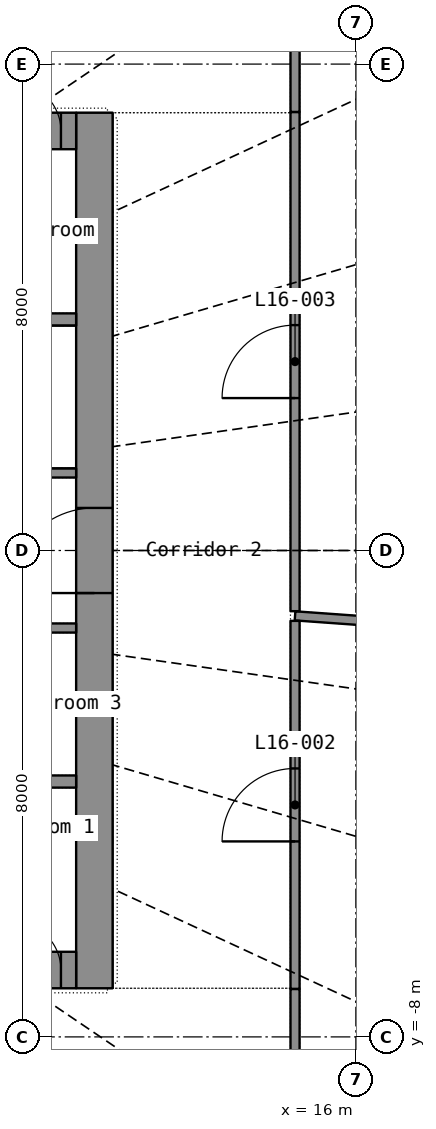
"""IFC4 building model, lengths in metres.
Left out: names, types, materials, properties, quantities, classifications, styles, units other than length and angle.
Written with IfcOpenShell. Run it as: python <this file> out.ifc"""

import sys

from ifc_helpers import new_model, si_unit, direction, frame, frame_2d, origin, place, context, subcontext, project, spatial, rectangle, extrude, element, fill, save


model = new_model("IFC4")
c1 = context("Model", 3, precision=1e-05, world=origin(), true_north=direction((0.0, 1.0)))
c2 = subcontext(c1, "Body", "Model", "MODEL_VIEW")
j1 = project(units=[si_unit("LENGTHUNIT", "METRE"), si_unit("PLANEANGLEUNIT", "RADIAN")], contexts=[c1])
p1 = place(None, origin())
s1 = spatial("IfcSite", under=j1, at=p1, CompositionType="ELEMENT")
p2 = place(p1, origin())
s2 = spatial("IfcBuilding", under=s1, at=p2, CompositionType="ELEMENT")
p3 = place(p2, frame((0.0, 0.0, 70.4)))
s3 = spatial("IfcBuildingStorey", under=s2, at=p3, CompositionType="ELEMENT", Elevation=70.4)
p4 = place(p3, frame((11.7, -7.2, 0.0), z_axis=(0.0, 0.0, 1.0), x_axis=(0.0, 1.0, 0.0)))
e1 = element("IfcWall", 1, at=p4, inside=s3, PredefinedType="SHEAR", context=c2, shape_type="SweptSolid", body=[
    extrude(rectangle(XDim=14.4, YDim=0.6, at=frame_2d((7.2, 0.0))), origin(), (0.0, 0.0, 1.0), 3.3),
])
p5 = place(p4, frame((6.5, 0.0, 0.0)))
e2 = element("IfcOpeningElement", 2, at=p5, cuts=e1, PredefinedType="OPENING", context=c2, shape_type="SweptSolid", body=[
    extrude(rectangle(XDim=1.4, YDim=2.2, at=frame_2d((0.7, 1.1))), frame((0.0, 0.31, 0.0), z_axis=(0.0, -1.0, 0.0), x_axis=(1.0, 0.0, 0.0)), (0.0, 0.0, 1.0), 0.62),
])
p6 = place(p3, frame((-11.4, -6.9, 0.0), z_axis=(0.0, 0.0, 1.0), x_axis=(1.0, 0.0, 0.0)))
e3 = element("IfcWall", 3, at=p6, inside=s3, PredefinedType="SHEAR", context=c2, shape_type="SweptSolid", body=[
    extrude(rectangle(XDim=22.8, YDim=0.6, at=frame_2d((11.4, 0.0))), origin(), (0.0, 0.0, 1.0), 3.3),
])
p7 = place(p6, frame((1.85, 0.0, 0.0)))
e4 = element("IfcOpeningElement", 4, at=p7, cuts=e3, PredefinedType="OPENING", context=c2, shape_type="SweptSolid", body=[
    extrude(rectangle(XDim=1.1, YDim=2.2, at=frame_2d((0.55, 1.1))), frame((0.0, 0.31, 0.0), z_axis=(0.0, -1.0, 0.0), x_axis=(1.0, 0.0, 0.0)), (0.0, 0.0, 1.0), 0.62),
])
p8 = place(p6, frame((3.85, 0.0, 0.0)))
e5 = element("IfcOpeningElement", 5, at=p8, cuts=e3, PredefinedType="OPENING", context=c2, shape_type="SweptSolid", body=[
    extrude(rectangle(XDim=1.1, YDim=2.2, at=frame_2d((0.55, 1.1))), frame((0.0, 0.31, 0.0), z_axis=(0.0, -1.0, 0.0), x_axis=(1.0, 0.0, 0.0)), (0.0, 0.0, 1.0), 0.62),
])
p9 = place(p6, frame((5.85, 0.0, 0.0)))
e6 = element("IfcOpeningElement", 6, at=p9, cuts=e3, PredefinedType="OPENING", context=c2, shape_type="SweptSolid", body=[
    extrude(rectangle(XDim=1.1, YDim=2.2, at=frame_2d((0.55, 1.1))), frame((0.0, 0.31, 0.0), z_axis=(0.0, -1.0, 0.0), x_axis=(1.0, 0.0, 0.0)), (0.0, 0.0, 1.0), 0.62),
])
p10 = place(p6, frame((7.85, 0.0, 0.0)))
e7 = element("IfcOpeningElement", 7, at=p10, cuts=e3, PredefinedType="OPENING", context=c2, shape_type="SweptSolid", body=[
    extrude(rectangle(XDim=1.1, YDim=2.2, at=frame_2d((0.55, 1.1))), frame((0.0, 0.31, 0.0), z_axis=(0.0, -1.0, 0.0), x_axis=(1.0, 0.0, 0.0)), (0.0, 0.0, 1.0), 0.62),
])
p11 = place(p6, frame((9.85, 0.0, 0.0)))
e8 = element("IfcOpeningElement", 8, at=p11, cuts=e3, PredefinedType="OPENING", context=c2, shape_type="SweptSolid", body=[
    extrude(rectangle(XDim=1.1, YDim=2.2, at=frame_2d((0.55, 1.1))), frame((0.0, 0.31, 0.0), z_axis=(0.0, -1.0, 0.0), x_axis=(1.0, 0.0, 0.0)), (0.0, 0.0, 1.0), 0.62),
])
p12 = place(p6, frame((11.85, 0.0, 0.0)))
e9 = element("IfcOpeningElement", 9, at=p12, cuts=e3, PredefinedType="OPENING", context=c2, shape_type="SweptSolid", body=[
    extrude(rectangle(XDim=1.1, YDim=2.2, at=frame_2d((0.55, 1.1))), frame((0.0, 0.31, 0.0), z_axis=(0.0, -1.0, 0.0), x_axis=(1.0, 0.0, 0.0)), (0.0, 0.0, 1.0), 0.62),
])
p13 = place(p6, frame((13.85, 0.0, 0.0)))
e10 = element("IfcOpeningElement", 10, at=p13, cuts=e3, PredefinedType="OPENING", context=c2, shape_type="SweptSolid", body=[
    extrude(rectangle(XDim=1.1, YDim=2.2, at=frame_2d((0.55, 1.1))), frame((0.0, 0.31, 0.0), z_axis=(0.0, -1.0, 0.0), x_axis=(1.0, 0.0, 0.0)), (0.0, 0.0, 1.0), 0.62),
])
p14 = place(p6, frame((15.85, 0.0, 0.0)))
e11 = element("IfcOpeningElement", 11, at=p14, cuts=e3, PredefinedType="OPENING", context=c2, shape_type="SweptSolid", body=[
    extrude(rectangle(XDim=1.1, YDim=2.2, at=frame_2d((0.55, 1.1))), frame((0.0, 0.31, 0.0), z_axis=(0.0, -1.0, 0.0), x_axis=(1.0, 0.0, 0.0)), (0.0, 0.0, 1.0), 0.62),
])
p15 = place(p6, frame((19.85, 0.0, 0.0)))
e12 = element("IfcOpeningElement", 12, at=p15, cuts=e3, PredefinedType="OPENING", context=c2, shape_type="SweptSolid", body=[
    extrude(rectangle(XDim=1.1, YDim=2.2, at=frame_2d((0.55, 1.1))), frame((0.0, 0.31, 0.0), z_axis=(0.0, -1.0, 0.0), x_axis=(1.0, 0.0, 0.0)), (0.0, 0.0, 1.0), 0.62),
])
p16 = place(p6, frame((0.25, 0.0, 0.0)))
e13 = element("IfcOpeningElement", 13, at=p16, cuts=e3, PredefinedType="OPENING", context=c2, shape_type="SweptSolid", body=[
    extrude(rectangle(XDim=0.8, YDim=2.05, at=frame_2d((0.4, 1.025))), frame((0.0, 0.31, 0.0), z_axis=(0.0, -1.0, 0.0), x_axis=(1.0, 0.0, 0.0)), (0.0, 0.0, 1.0), 0.62),
])
p17 = place(p6, frame((21.75, 0.0, 0.0)))
e14 = element("IfcOpeningElement", 14, at=p17, cuts=e3, PredefinedType="OPENING", context=c2, shape_type="SweptSolid", body=[
    extrude(rectangle(XDim=0.8, YDim=2.05, at=frame_2d((0.4, 1.025))), frame((0.0, 0.31, 0.0), z_axis=(0.0, -1.0, 0.0), x_axis=(1.0, 0.0, 0.0)), (0.0, 0.0, 1.0), 0.62),
])
p18 = place(p3, frame((-11.4, 6.9, 0.0), z_axis=(0.0, 0.0, 1.0), x_axis=(1.0, 0.0, 0.0)))
e15 = element("IfcWall", 15, at=p18, inside=s3, PredefinedType="SHEAR", context=c2, shape_type="SweptSolid", body=[
    extrude(rectangle(XDim=22.8, YDim=0.6, at=frame_2d((11.4, 0.0))), origin(), (0.0, 0.0, 1.0), 3.3),
])
p19 = place(p18, frame((1.85, 0.0, 0.0)))
e16 = element("IfcOpeningElement", 16, at=p19, cuts=e15, PredefinedType="OPENING", context=c2, shape_type="SweptSolid", body=[
    extrude(rectangle(XDim=1.1, YDim=2.2, at=frame_2d((0.55, 1.1))), frame((0.0, 0.31, 0.0), z_axis=(0.0, -1.0, 0.0), x_axis=(1.0, 0.0, 0.0)), (0.0, 0.0, 1.0), 0.62),
])
p20 = place(p18, frame((7.95, 0.0, 0.0)))
e17 = element("IfcOpeningElement", 17, at=p20, cuts=e15, PredefinedType="OPENING", context=c2, shape_type="SweptSolid", body=[
    extrude(rectangle(XDim=0.9, YDim=2.1, at=frame_2d((0.45, 1.05))), frame((0.0, 0.31, 0.0), z_axis=(0.0, -1.0, 0.0), x_axis=(1.0, 0.0, 0.0)), (0.0, 0.0, 1.0), 0.62),
])
p21 = place(p18, frame((13.95, 0.0, 0.0)))
e18 = element("IfcOpeningElement", 18, at=p21, cuts=e15, PredefinedType="OPENING", context=c2, shape_type="SweptSolid", body=[
    extrude(rectangle(XDim=0.9, YDim=2.1, at=frame_2d((0.45, 1.05))), frame((0.0, 0.31, 0.0), z_axis=(0.0, -1.0, 0.0), x_axis=(1.0, 0.0, 0.0)), (0.0, 0.0, 1.0), 0.62),
])
p22 = place(p18, frame((18.95, 0.0, 0.0)))
e19 = element("IfcOpeningElement", 19, at=p22, cuts=e15, PredefinedType="OPENING", context=c2, shape_type="SweptSolid", body=[
    extrude(rectangle(XDim=0.9, YDim=2.1, at=frame_2d((0.45, 1.05))), frame((0.0, 0.31, 0.0), z_axis=(0.0, -1.0, 0.0), x_axis=(1.0, 0.0, 0.0)), (0.0, 0.0, 1.0), 0.62),
])
p23 = place(p18, frame((0.25, 0.0, 0.0)))
e20 = element("IfcOpeningElement", 20, at=p23, cuts=e15, PredefinedType="OPENING", context=c2, shape_type="SweptSolid", body=[
    extrude(rectangle(XDim=0.8, YDim=2.05, at=frame_2d((0.4, 1.025))), frame((0.0, 0.31, 0.0), z_axis=(0.0, -1.0, 0.0), x_axis=(1.0, 0.0, 0.0)), (0.0, 0.0, 1.0), 0.62),
])
p24 = place(p18, frame((21.75, 0.0, 0.0)))
e21 = element("IfcOpeningElement", 21, at=p24, cuts=e15, PredefinedType="OPENING", context=c2, shape_type="SweptSolid", body=[
    extrude(rectangle(XDim=0.8, YDim=2.05, at=frame_2d((0.4, 1.025))), frame((0.0, 0.31, 0.0), z_axis=(0.0, -1.0, 0.0), x_axis=(1.0, 0.0, 0.0)), (0.0, 0.0, 1.0), 0.62),
])
for number, where, z_axis, x_axis in (
    (22, (-11.4, -3.8, 0.0), (0.0, 0.0, 1.0), (1.0, 0.0, 0.0)),
    (23, (-11.4, 3.8, 0.0), (0.0, 0.0, 1.0), (1.0, 0.0, 0.0)),
):
    element("IfcWall", number, at=place(p3, frame(where, z_axis=z_axis, x_axis=x_axis)), inside=s3, PredefinedType="SHEAR", context=c2, shape_type="SweptSolid", body=[
        extrude(rectangle(XDim=22.8, YDim=0.2, at=frame_2d((11.4, 0.0))), origin(), (0.0, 0.0, 1.0), 3.3),
    ])
p25 = place(p3, frame((3.0, -1.275, 0.0), z_axis=(0.0, 0.0, 1.0), x_axis=(1.0, 0.0, 0.0)))
e24 = element("IfcWall", 24, at=p25, inside=s3, PredefinedType="PARTITIONING", context=c2, shape_type="SweptSolid", body=[
    extrude(rectangle(XDim=8.4, YDim=0.15, at=frame_2d((4.2, 0.0))), origin(), (0.0, 0.0, 1.0), 3.3),
])
p26 = place(p25, frame((0.688, 0.0, 0.0)))
e25 = element("IfcOpeningElement", 25, at=p26, cuts=e24, PredefinedType="OPENING", context=c2, shape_type="SweptSolid", body=[
    extrude(rectangle(XDim=0.85, YDim=2.1, at=frame_2d((0.425, 1.05))), frame((0.0, 0.085, 0.0), z_axis=(0.0, -1.0, 0.0), x_axis=(1.0, 0.0, 0.0)), (0.0, 0.0, 1.0), 0.17),
])
p27 = place(p25, frame((3.144, 0.0, 0.0)))
e26 = element("IfcOpeningElement", 26, at=p27, cuts=e24, PredefinedType="OPENING", context=c2, shape_type="SweptSolid", body=[
    extrude(rectangle(XDim=0.85, YDim=2.1, at=frame_2d((0.425, 1.05))), frame((0.0, 0.085, 0.0), z_axis=(0.0, -1.0, 0.0), x_axis=(1.0, 0.0, 0.0)), (0.0, 0.0, 1.0), 0.17),
])
p28 = place(p25, frame((5.256, 0.0, 0.0)))
e27 = element("IfcOpeningElement", 27, at=p28, cuts=e24, PredefinedType="OPENING", context=c2, shape_type="SweptSolid", body=[
    extrude(rectangle(XDim=0.9, YDim=2.1, at=frame_2d((0.45, 1.05))), frame((0.0, 0.085, 0.0), z_axis=(0.0, -1.0, 0.0), x_axis=(1.0, 0.0, 0.0)), (0.0, 0.0, 1.0), 0.17),
])
p29 = place(p25, frame((7.075, 0.0, 0.0)))
e28 = element("IfcOpeningElement", 28, at=p29, cuts=e24, PredefinedType="OPENING", context=c2, shape_type="SweptSolid", body=[
    extrude(rectangle(XDim=0.9, YDim=2.1, at=frame_2d((0.45, 1.05))), frame((0.0, 0.085, 0.0), z_axis=(0.0, -1.0, 0.0), x_axis=(1.0, 0.0, 0.0)), (0.0, 0.0, 1.0), 0.17),
])
p30 = place(p3, frame((3.0, 1.275, 0.0), z_axis=(0.0, 0.0, 1.0), x_axis=(1.0, 0.0, 0.0)))
e29 = element("IfcWall", 29, at=p30, inside=s3, PredefinedType="SHEAR", context=c2, shape_type="SweptSolid", body=[
    extrude(rectangle(XDim=8.4, YDim=0.15, at=frame_2d((4.2, 0.0))), origin(), (0.0, 0.0, 1.0), 3.3),
])
p31 = place(p30, frame((2.05, 0.0, 0.0)))
e30 = element("IfcOpeningElement", 30, at=p31, cuts=e29, PredefinedType="OPENING", context=c2, shape_type="SweptSolid", body=[
    extrude(rectangle(XDim=1.1, YDim=2.15, at=frame_2d((0.55, 1.075))), frame((0.0, 0.085, 0.0), z_axis=(0.0, -1.0, 0.0), x_axis=(1.0, 0.0, 0.0)), (0.0, 0.0, 1.0), 0.17),
])
p32 = place(p30, frame((0.45, 0.0, 0.0)))
e31 = element("IfcOpeningElement", 31, at=p32, cuts=e29, PredefinedType="OPENING", context=c2, shape_type="SweptSolid", body=[
    extrude(rectangle(XDim=0.9, YDim=2.1, at=frame_2d((0.45, 1.05))), frame((0.0, 0.085, 0.0), z_axis=(0.0, -1.0, 0.0), x_axis=(1.0, 0.0, 0.0)), (0.0, 0.0, 1.0), 0.17),
])
p33 = place(p3, frame((26.692, -1.913, 0.0), z_axis=(0.0, 0.0, 1.0), x_axis=(-0.997441861, 0.071482396, 0.0)))
e32 = element("IfcWall", 32, at=p33, inside=s3, PredefinedType="PARTITIONING", context=c2, shape_type="SweptSolid", body=[
    extrude(rectangle(XDim=11.722, YDim=0.15, at=frame_2d((5.861, 0.0))), origin(), (0.0, 0.0, 1.0), 2.4),
])
p34 = place(p3, frame((15.0, -0.998, 0.0), z_axis=(0.0, 0.0, 1.0), x_axis=(0.0, 1.0, 0.0)))
e33 = element("IfcWall", 33, at=p34, inside=s3, PredefinedType="PARTITIONING", context=c2, shape_type="SweptSolid", body=[
    extrude(rectangle(XDim=8.21, YDim=0.15, at=frame_2d((4.105, 0.0))), origin(), (0.0, 0.0, 1.0), 2.4),
])
p35 = place(p34, frame((3.505, 0.0, 0.0)))
e34 = element("IfcOpeningElement", 34, at=p35, cuts=e33, PredefinedType="OPENING", context=c2, shape_type="SweptSolid", body=[
    extrude(rectangle(XDim=1.2, YDim=2.2, at=frame_2d((0.6, 1.1))), frame((0.0, 0.085, 0.0), z_axis=(0.0, -1.0, 0.0), x_axis=(1.0, 0.0, 0.0)), (0.0, 0.0, 1.0), 0.17),
])
p36 = place(p3, frame((15.0, -7.212, 0.0), z_axis=(0.0, 0.0, 1.0), x_axis=(0.0, 1.0, 0.0)))
e35 = element("IfcWall", 35, at=p36, inside=s3, PredefinedType="PARTITIONING", context=c2, shape_type="SweptSolid", body=[
    extrude(rectangle(XDim=6.054, YDim=0.15, at=frame_2d((3.027, 0.0))), origin(), (0.0, 0.0, 1.0), 2.4),
])
p37 = place(p36, frame((2.427, 0.0, 0.0)))
e36 = element("IfcOpeningElement", 36, at=p37, cuts=e35, PredefinedType="OPENING", context=c2, shape_type="SweptSolid", body=[
    extrude(rectangle(XDim=1.2, YDim=2.2, at=frame_2d((0.6, 1.1))), frame((0.0, 0.085, 0.0), z_axis=(0.0, -1.0, 0.0), x_axis=(1.0, 0.0, 0.0)), (0.0, 0.0, 1.0), 0.17),
])
p38 = place(p3, frame((15.0, -10.723, 0.0), z_axis=(0.0, 0.0, 1.0), x_axis=(0.0, 1.0, 0.0)))
e37 = element("IfcWall", 37, at=p38, inside=s3, PredefinedType="PARTITIONING", context=c2, shape_type="SweptSolid", body=[
    extrude(rectangle(XDim=3.51, YDim=0.15, at=frame_2d((1.755, 0.0))), origin(), (0.0, 0.0, 1.0), 2.4),
])
p39 = place(p3, frame((15.0, 7.213, 0.0), z_axis=(0.0, 0.0, 1.0), x_axis=(0.0, 1.0, 0.0)))
e38 = element("IfcWall", 38, at=p39, inside=s3, PredefinedType="PARTITIONING", context=c2, shape_type="SweptSolid", body=[
    extrude(rectangle(XDim=2.31, YDim=0.15, at=frame_2d((1.155, 0.0))), origin(), (0.0, 0.0, 1.0), 2.4),
])
p40 = place(p17, origin())
e39 = element("IfcDoor", 39, at=p40, inside=s3, OperationType="SINGLE_SWING_LEFT", PredefinedType="DOOR", context=c2, shape_type="SweptSolid", body=[
    extrude(rectangle(XDim=0.8, YDim=2.05, at=frame_2d((0.4, 1.025))), frame((0.0, 0.025, 0.0), z_axis=(0.0, -1.0, 0.0), x_axis=(1.0, 0.0, 0.0)), (0.0, 0.0, 1.0), 0.05),
])
fill(e14, e39)
p41 = place(p24, origin())
e40 = element("IfcDoor", 40, at=p41, inside=s3, OperationType="SINGLE_SWING_LEFT", PredefinedType="DOOR", context=c2, shape_type="SweptSolid", body=[
    extrude(rectangle(XDim=0.8, YDim=2.05, at=frame_2d((0.4, 1.025))), frame((0.0, 0.025, 0.0), z_axis=(0.0, -1.0, 0.0), x_axis=(1.0, 0.0, 0.0)), (0.0, 0.0, 1.0), 0.05),
])
fill(e21, e40)
p42 = place(p5, origin())
e41 = element("IfcDoor", 41, at=p42, inside=s3, OperationType="DOUBLE_DOOR_SINGLE_SWING", PredefinedType="DOOR", context=c2, shape_type="SweptSolid", body=[
    extrude(rectangle(XDim=1.4, YDim=2.2, at=frame_2d((0.7, 1.1))), frame((0.0, 0.025, 0.0), z_axis=(0.0, -1.0, 0.0), x_axis=(1.0, 0.0, 0.0)), (0.0, 0.0, 1.0), 0.05),
])
fill(e2, e41)
p43 = place(p37, origin())
e42 = element("IfcDoor", 42, at=p43, inside=s3, OperationType="DOUBLE_DOOR_SINGLE_SWING", PredefinedType="DOOR", context=c2, shape_type="SweptSolid", body=[
    extrude(rectangle(XDim=1.2, YDim=2.2, at=frame_2d((0.6, 1.1))), frame((0.0, 0.025, 0.0), z_axis=(0.0, -1.0, 0.0), x_axis=(1.0, 0.0, 0.0)), (0.0, 0.0, 1.0), 0.05),
])
fill(e36, e42)
p44 = place(p35, origin())
e43 = element("IfcDoor", 43, at=p44, inside=s3, OperationType="DOUBLE_DOOR_SINGLE_SWING", PredefinedType="DOOR", context=c2, shape_type="SweptSolid", body=[
    extrude(rectangle(XDim=1.2, YDim=2.2, at=frame_2d((0.6, 1.1))), frame((0.0, 0.025, 0.0), z_axis=(0.0, -1.0, 0.0), x_axis=(1.0, 0.0, 0.0)), (0.0, 0.0, 1.0), 0.05),
])
fill(e34, e43)
save(model, sys.argv[1])
